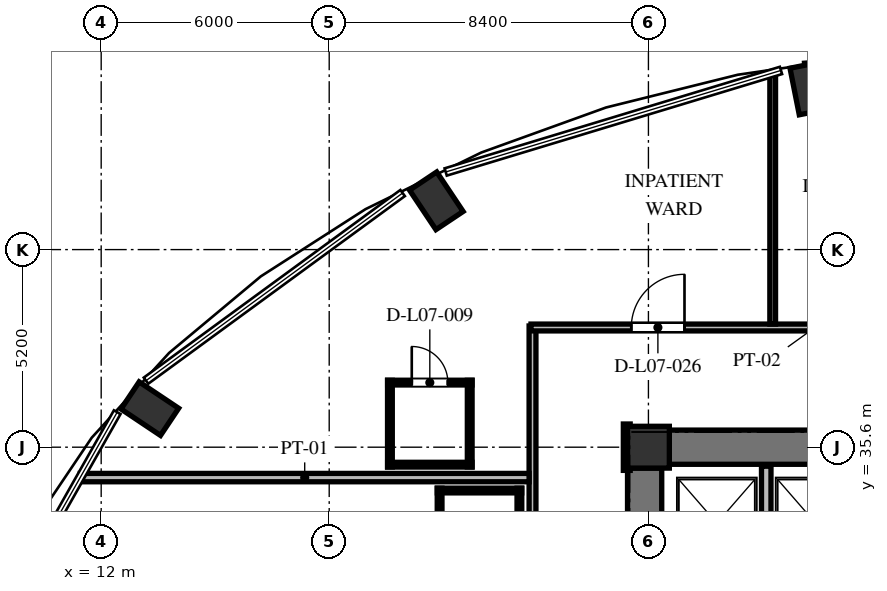
"""IFC4 building model, lengths in metres.
Left out: names, types, materials, properties, quantities, classifications, styles, units other than length and angle.
Written with IfcOpenShell. Run it as: python <this file> out.ifc"""

import sys

from ifc_helpers import new_model, si_unit, direction, frame, frame_2d, origin, origin_2d, place, context, subcontext, project, spatial, rectangle, extrude, element, fill, save


model = new_model("IFC4")
c1 = context("Model", 3, precision=1e-05, world=origin(), true_north=direction((0.0, 1.0)))
c2 = subcontext(c1, "Body", "Model", "MODEL_VIEW")
j1 = project(units=[si_unit("LENGTHUNIT", "METRE"), si_unit("PLANEANGLEUNIT", "RADIAN")], contexts=[c1])
p1 = place(None, origin())
s1 = spatial("IfcSite", under=j1, at=p1, CompositionType="ELEMENT")
p2 = place(p1, origin())
s2 = spatial("IfcBuilding", under=s1, at=p2, CompositionType="ELEMENT")
p3 = place(p2, frame((0.0, 0.0, 32.496)))
s3 = spatial("IfcBuildingStorey", under=s2, at=p3, CompositionType="ELEMENT", Elevation=32.496)
for number, where, z_axis, x_axis in (
    (1, (30.669, 45.044, 0.0), (0.0, 0.0, 1.0), (-0.195, 0.981, 0.0)),
    (2, (20.819, 42.084, 0.0), (0.0, 0.0, 1.0), (-0.556, 0.831, 0.0)),
    (3, (13.28, 36.614, 0.0), (0.0, 0.0, 1.0), (-0.831, 0.556, 0.0)),
):
    element("IfcColumn", number, at=place(p3, frame(where, z_axis=z_axis, x_axis=x_axis)), inside=s3, PredefinedType="COLUMN", context=c2, shape_type="SweptSolid", body=[
        extrude(rectangle(XDim=1.25, YDim=0.86, at=origin_2d()), origin(), (0.0, 0.0, 1.0), 3.648),
    ])
p4 = place(p3, frame((26.4, 35.6, 0.0), z_axis=(0.0, 0.0, 1.0), x_axis=(1.0, 0.0, 0.0)))
e4 = element("IfcColumn", 4, at=p4, inside=s3, PredefinedType="COLUMN", context=c2, shape_type="SweptSolid", body=[
    extrude(rectangle(XDim=1.1, YDim=1.1, at=origin_2d()), origin(), (0.0, 0.0, 1.0), 3.648),
])
p5 = place(p3, frame((26.3, 20.95, 0.0), z_axis=(0.0, 0.0, 1.0), x_axis=(0.0, 1.0, 0.0)))
e5 = element("IfcWall", 5, at=p5, inside=s3, PredefinedType="SHEAR", context=c2, shape_type="SweptSolid", body=[
    extrude(rectangle(XDim=14.1, YDim=0.9, at=frame_2d((7.05, 0.0))), origin(), (0.0, 0.0, 1.0), 3.648),
])
p6 = place(p5, frame((6.5, 0.0, 0.0)))
e6 = element("IfcOpeningElement", 6, at=p6, cuts=e5, PredefinedType="OPENING", context=c2, shape_type="SweptSolid", body=[
    extrude(rectangle(XDim=1.2, YDim=2.15, at=frame_2d((0.6, 1.075))), frame((0.0, 0.46, 0.0), z_axis=(0.0, -1.0, 0.0), x_axis=(1.0, 0.0, 0.0)), (0.0, 0.0, 1.0), 0.92),
])
p7 = place(p5, frame((9.6, 0.0, 0.0)))
e7 = element("IfcOpeningElement", 7, at=p7, cuts=e5, PredefinedType="OPENING", context=c2, shape_type="SweptSolid", body=[
    extrude(rectangle(XDim=1.3, YDim=2.2, at=frame_2d((0.65, 1.1))), frame((0.0, 0.46, 0.0), z_axis=(0.0, -1.0, 0.0), x_axis=(1.0, 0.0, 0.0)), (0.0, 0.0, 1.0), 0.92),
])
p8 = place(p5, frame((3.26, 0.0, 0.0)))
e8 = element("IfcOpeningElement", 8, at=p8, cuts=e5, PredefinedType="OPENING", context=c2, shape_type="SweptSolid", body=[
    extrude(rectangle(XDim=1.3, YDim=2.2, at=frame_2d((0.65, 1.1))), frame((0.0, 0.46, 0.0), z_axis=(0.0, -1.0, 0.0), x_axis=(1.0, 0.0, 0.0)), (0.0, 0.0, 1.0), 0.92),
])
p9 = place(p3, frame((26.95, 35.6, 0.0), z_axis=(0.0, 0.0, 1.0), x_axis=(1.0, 0.0, 0.0)))
e9 = element("IfcWall", 9, at=p9, inside=s3, PredefinedType="SHEAR", context=c2, shape_type="SweptSolid", body=[
    extrude(rectangle(XDim=5.3, YDim=0.9, at=frame_2d((2.65, 0.0))), origin(), (0.0, 0.0, 1.0), 3.648),
])
p10 = place(p3, frame((36.179, 45.953, 0.0), z_axis=(0.0, 0.0, 1.0), x_axis=(-0.997421878774, -0.071760683825, 0.0)))
e10 = element("IfcWall", 10, at=p10, inside=s3, PredefinedType="SOLIDWALL", context=c2, shape_type="SweptSolid", body=[
    extrude(rectangle(XDim=5.675, YDim=0.32, at=frame_2d((2.837, 0.0))), origin(), (0.0, 0.0, 1.0), 3.428),
])
p11 = place(p10, frame((2.696, 0.0, 0.85)))
e11 = element("IfcOpeningElement", 11, at=p11, cuts=e10, PredefinedType="OPENING", context=c2, shape_type="SweptSolid", body=[
    extrude(rectangle(XDim=1.2, YDim=1.8, at=frame_2d((0.6, 0.9))), frame((0.0, 0.17, 0.0), z_axis=(0.0, -1.0, 0.0), x_axis=(1.0, 0.0, 0.0)), (0.0, 0.0, 1.0), 0.34),
])
p12 = place(p3, frame((29.5, 32.42, 0.0), z_axis=(0.0, 0.0, 1.0), x_axis=(0.0, 1.0, 0.0)))
e12 = element("IfcWall", 12, at=p12, inside=s3, PredefinedType="SOLIDWALL", context=c2, shape_type="SweptSolid", body=[
    extrude(rectangle(XDim=2.68, YDim=0.25, at=frame_2d((1.34, 0.0))), origin(), (0.0, 0.0, 1.0), 3.428),
])
p13 = place(p3, frame((23.35, 29.36, 0.0), z_axis=(0.0, 0.0, 1.0), x_axis=(0.0, 1.0, 0.0)))
e13 = element("IfcWall", 13, at=p13, inside=s3, PredefinedType="PARTITIONING", context=c2, shape_type="SweptSolid", body=[
    extrude(rectangle(XDim=9.43, YDim=0.18, at=frame_2d((4.715, 0.0))), origin(), (0.0, 0.0, 1.0), 3.428),
])
p14 = place(p3, frame((23.31, 38.75, 0.0), z_axis=(0.0, 0.0, 1.0), x_axis=(1.0, 0.0, 0.0)))
e14 = element("IfcWall", 14, at=p14, inside=s3, PredefinedType="PARTITIONING", context=c2, shape_type="SweptSolid", body=[
    extrude(rectangle(XDim=29.88, YDim=0.18, at=frame_2d((14.94, 0.0))), origin(), (0.0, 0.0, 1.0), 3.053),
])
p15 = place(p14, frame((25.591, 0.0, 0.0)))
e15 = element("IfcOpeningElement", 15, at=p15, cuts=e14, PredefinedType="OPENING", context=c2, shape_type="SweptSolid", body=[
    extrude(rectangle(XDim=1.4, YDim=2.2, at=frame_2d((0.7, 1.1))), frame((0.0, 0.1, 0.0), z_axis=(0.0, -1.0, 0.0), x_axis=(1.0, 0.0, 0.0)), (0.0, 0.0, 1.0), 0.2),
])
p16 = place(p14, frame((20.24, 0.0, 0.0)))
e16 = element("IfcOpeningElement", 16, at=p16, cuts=e14, PredefinedType="OPENING", context=c2, shape_type="SweptSolid", body=[
    extrude(rectangle(XDim=1.4, YDim=2.2, at=frame_2d((0.7, 1.1))), frame((0.0, 0.1, 0.0), z_axis=(0.0, -1.0, 0.0), x_axis=(1.0, 0.0, 0.0)), (0.0, 0.0, 1.0), 0.2),
])
p17 = place(p14, frame((16.075, 0.0, 0.0)))
e17 = element("IfcOpeningElement", 17, at=p17, cuts=e14, PredefinedType="OPENING", context=c2, shape_type="SweptSolid", body=[
    extrude(rectangle(XDim=1.4, YDim=2.2, at=frame_2d((0.7, 1.1))), frame((0.0, 0.1, 0.0), z_axis=(0.0, -1.0, 0.0), x_axis=(1.0, 0.0, 0.0)), (0.0, 0.0, 1.0), 0.2),
])
p18 = place(p14, frame((11.905, 0.0, 0.0)))
e18 = element("IfcOpeningElement", 18, at=p18, cuts=e14, PredefinedType="OPENING", context=c2, shape_type="SweptSolid", body=[
    extrude(rectangle(XDim=1.4, YDim=2.2, at=frame_2d((0.7, 1.1))), frame((0.0, 0.1, 0.0), z_axis=(0.0, -1.0, 0.0), x_axis=(1.0, 0.0, 0.0)), (0.0, 0.0, 1.0), 0.2),
])
p19 = place(p14, frame((7.74, 0.0, 0.0)))
e19 = element("IfcOpeningElement", 19, at=p19, cuts=e14, PredefinedType="OPENING", context=c2, shape_type="SweptSolid", body=[
    extrude(rectangle(XDim=1.4, YDim=2.2, at=frame_2d((0.7, 1.1))), frame((0.0, 0.1, 0.0), z_axis=(0.0, -1.0, 0.0), x_axis=(1.0, 0.0, 0.0)), (0.0, 0.0, 1.0), 0.2),
])
p20 = place(p14, frame((2.639, 0.0, 0.0)))
e20 = element("IfcOpeningElement", 20, at=p20, cuts=e14, PredefinedType="OPENING", context=c2, shape_type="SweptSolid", body=[
    extrude(rectangle(XDim=1.4, YDim=2.2, at=frame_2d((0.7, 1.1))), frame((0.0, 0.1, 0.0), z_axis=(0.0, -1.0, 0.0), x_axis=(1.0, 0.0, 0.0)), (0.0, 0.0, 1.0), 0.2),
])
p21 = place(p3, frame((25.83, 36.21, 0.0), z_axis=(0.0, 0.0, 1.0), x_axis=(0.0, -1.0, 0.0)))
e21 = element("IfcWall", 21, at=p21, inside=s3, PredefinedType="PARTITIONING", context=c2, shape_type="SweptSolid", body=[
    extrude(rectangle(XDim=1.22, YDim=0.18, at=frame_2d((0.61, 0.0))), origin(), (0.0, 0.0, 1.0), 3.428),
])
p22 = place(p3, frame((11.451, 34.8, 0.0), z_axis=(0.0, 0.0, 1.0), x_axis=(1.0, 0.0, 0.0)))
e22 = element("IfcWall", 22, at=p22, inside=s3, PredefinedType="PARTITIONING", context=c2, shape_type="SweptSolid", body=[
    extrude(rectangle(XDim=11.809, YDim=0.22, at=frame_2d((5.905, 0.0))), origin(), (0.0, 0.0, 1.0), 3.428),
])
p23 = place(p3, frame((29.67, 38.84, 0.0), z_axis=(0.0, 0.0, 1.0), x_axis=(0.0, 1.0, 0.0)))
e23 = element("IfcWall", 23, at=p23, inside=s3, PredefinedType="PARTITIONING", context=c2, shape_type="SweptSolid", body=[
    extrude(rectangle(XDim=6.596, YDim=0.15, at=frame_2d((3.298, 0.0))), origin(), (0.0, 0.0, 1.0), 3.428),
])
p24 = place(p3, frame((19.538, 37.3, 0.0), z_axis=(0.0, 0.0, 1.0), x_axis=(1.0, 0.0, 0.0)))
e24 = element("IfcWall", 24, at=p24, inside=s3, PredefinedType="PARTITIONING", context=c2, shape_type="SweptSolid", body=[
    extrude(rectangle(XDim=2.22, YDim=0.125, at=frame_2d((1.11, 0.0))), origin(), (0.0, 0.0, 1.0), 3.428),
])
p25 = place(p24, frame((0.635, 0.0, 0.0)))
e25 = element("IfcOpeningElement", 25, at=p25, cuts=e24, PredefinedType="OPENING", context=c2, shape_type="SweptSolid", body=[
    extrude(rectangle(XDim=0.95, YDim=2.1, at=frame_2d((0.475, 1.05))), frame((0.0, 0.073, 0.0), z_axis=(0.0, -1.0, 0.0), x_axis=(1.0, 0.0, 0.0)), (0.0, 0.0, 1.0), 0.145),
])
p26 = place(p3, frame((19.538, 35.14, 0.0), z_axis=(0.0, 0.0, 1.0), x_axis=(1.0, 0.0, 0.0)))
e26 = element("IfcWall", 26, at=p26, inside=s3, PredefinedType="PARTITIONING", context=c2, shape_type="SweptSolid", body=[
    extrude(rectangle(XDim=2.22, YDim=0.125, at=frame_2d((1.11, 0.0))), origin(), (0.0, 0.0, 1.0), 3.428),
])
for number, where, z_axis, x_axis in (
    (27, (21.698, 35.08, 0.0), (0.0, 0.0, 1.0), (0.0, 1.0, 0.0)),
    (28, (19.597, 35.08, 0.0), (0.0, 0.0, 1.0), (0.0, 1.0, 0.0)),
):
    element("IfcWall", number, at=place(p3, frame(where, z_axis=z_axis, x_axis=x_axis)), inside=s3, PredefinedType="PARTITIONING", context=c2, shape_type="SweptSolid", body=[
        extrude(rectangle(XDim=2.28, YDim=0.125, at=frame_2d((1.14, 0.0))), origin(), (0.0, 0.0, 1.0), 3.428),
    ])
p27 = place(p3, frame((20.845, 34.46, 0.0), z_axis=(0.0, 0.0, 1.0), x_axis=(1.0, 0.0, 0.0)))
e29 = element("IfcWall", 29, at=p27, inside=s3, PredefinedType="PARTITIONING", context=c2, shape_type="SweptSolid", body=[
    extrude(rectangle(XDim=2.22, YDim=0.125, at=frame_2d((1.11, 0.0))), origin(), (0.0, 0.0, 1.0), 3.428),
])
for number, where, z_axis, x_axis in (
    (30, (23.005, 32.24, 0.0), (0.0, 0.0, 1.0), (0.0, 1.0, 0.0)),
    (31, (20.905, 32.24, 0.0), (0.0, 0.0, 1.0), (0.0, 1.0, 0.0)),
):
    element("IfcWall", number, at=place(p3, frame(where, z_axis=z_axis, x_axis=x_axis)), inside=s3, PredefinedType="PARTITIONING", context=c2, shape_type="SweptSolid", body=[
        extrude(rectangle(XDim=2.28, YDim=0.125, at=frame_2d((1.14, 0.0))), origin(), (0.0, 0.0, 1.0), 3.428),
    ])
p28 = place(p25, origin())
e32 = element("IfcDoor", 32, at=p28, inside=s3, OperationType="SINGLE_SWING_LEFT", PredefinedType="DOOR", context=c2, shape_type="SweptSolid", body=[
    extrude(rectangle(XDim=0.95, YDim=2.1, at=frame_2d((0.475, 1.05))), frame((0.0, 0.025, 0.0), z_axis=(0.0, -1.0, 0.0), x_axis=(1.0, 0.0, 0.0)), (0.0, 0.0, 1.0), 0.05),
])
fill(e25, e32)
p29 = place(p20, origin())
e33 = element("IfcDoor", 33, at=p29, inside=s3, OperationType="SINGLE_SWING_RIGHT", PredefinedType="DOOR", context=c2, shape_type="SweptSolid", body=[
    extrude(rectangle(XDim=1.4, YDim=2.2, at=frame_2d((0.7, 1.1))), frame((0.0, 0.025, 0.0), z_axis=(0.0, -1.0, 0.0), x_axis=(1.0, 0.0, 0.0)), (0.0, 0.0, 1.0), 0.05),
])
fill(e20, e33)
save(model, sys.argv[1])
